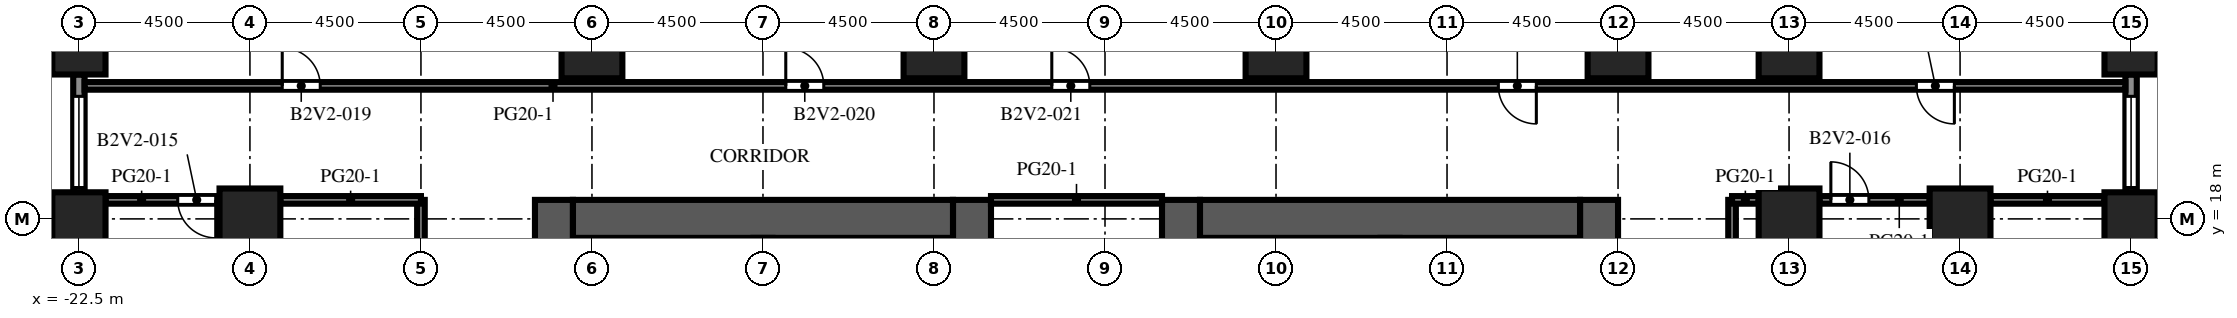
"""IFC4 building model, lengths in metres.
Left out: names, types, materials, properties, quantities, classifications, styles, units other than length and angle.
Written with IfcOpenShell. Run it as: python <this file> out.ifc"""

import sys

from ifc_helpers import new_model, si_unit, direction, frame, frame_2d, origin, origin_2d, place, context, subcontext, project, spatial, rectangle, extrude, element, fill, save


model = new_model("IFC4")
c1 = context("Model", 3, precision=1e-05, world=origin(), true_north=direction((0.0, 1.0)))
c2 = subcontext(c1, "Body", "Model", "MODEL_VIEW")
j1 = project(units=[si_unit("LENGTHUNIT", "METRE"), si_unit("PLANEANGLEUNIT", "RADIAN")], contexts=[c1])
p1 = place(None, origin())
s1 = spatial("IfcSite", under=j1, at=p1, CompositionType="ELEMENT")
p2 = place(p1, origin())
s2 = spatial("IfcBuilding", under=s1, at=p2, CompositionType="ELEMENT")
p3 = place(p2, frame((0.0, 0.0, 58.3)))
s3 = spatial("IfcBuildingStorey", under=s2, at=p3, CompositionType="ELEMENT", Elevation=58.3)
for number, where, z_axis, x_axis in (
    (1, (-22.5, 18.0, 0.0), (0.0, 0.0, 1.0), (1.0, 0.0, 0.0)),
    (2, (-22.5, 22.5, 0.0), (0.0, 0.0, 1.0), (1.0, 0.0, 0.0)),
    (3, (31.5, 18.0, 0.0), (0.0, 0.0, 1.0), (1.0, 0.0, 0.0)),
    (4, (31.5, 22.5, 0.0), (0.0, 0.0, 1.0), (1.0, 0.0, 0.0)),
):
    element("IfcColumn", number, at=place(p3, frame(where, z_axis=z_axis, x_axis=x_axis)), inside=s3, PredefinedType="COLUMN", context=c2, shape_type="SweptSolid", body=[
        extrude(rectangle(XDim=1.4, YDim=1.4, at=origin_2d()), origin(), (0.0, 0.0, 1.0), 4.1),
    ])
for number, where, z_axis, x_axis in (
    (5, (-18.0, 18.0, 0.0), (0.0, 0.0, 1.0), (1.0, 0.0, 0.0)),
    (6, (-9.0, 22.5, 0.0), (0.0, 0.0, 1.0), (1.0, 0.0, 0.0)),
    (7, (0.0, 22.5, 0.0), (0.0, 0.0, 1.0), (1.0, 0.0, 0.0)),
    (8, (9.0, 22.5, 0.0), (0.0, 0.0, 1.0), (1.0, 0.0, 0.0)),
    (9, (18.0, 22.5, 0.0), (0.0, 0.0, 1.0), (1.0, 0.0, 0.0)),
    (10, (22.5, 18.0, 0.0), (0.0, 0.0, 1.0), (1.0, 0.0, 0.0)),
    (11, (22.5, 22.5, 0.0), (0.0, 0.0, 1.0), (1.0, 0.0, 0.0)),
    (12, (27.0, 18.0, 0.0), (0.0, 0.0, 1.0), (1.0, 0.0, 0.0)),
):
    element("IfcColumn", number, at=place(p3, frame(where, z_axis=z_axis, x_axis=x_axis)), inside=s3, PredefinedType="COLUMN", context=c2, shape_type="SweptSolid", body=[
        extrude(rectangle(XDim=1.6, YDim=1.6, at=origin_2d()), origin(), (0.0, 0.0, 1.0), 4.1),
    ])
p4 = place(p3, frame((-10.0, -9.0, 0.0), z_axis=(0.0, 0.0, 1.0), x_axis=(0.0, 1.0, 0.0)))
e13 = element("IfcWall", 13, at=p4, inside=s3, PredefinedType="SHEAR", context=c2, shape_type="SweptSolid", body=[
    extrude(rectangle(XDim=27.5, YDim=1.0, at=frame_2d((13.75, 0.0))), origin(), (0.0, 0.0, 1.0), 4.1),
])
p5 = place(p4, frame((12.55, 0.0, 0.0)))
e14 = element("IfcOpeningElement", 14, at=p5, cuts=e13, PredefinedType="OPENING", context=c2, shape_type="SweptSolid", body=[
    extrude(rectangle(XDim=2.4, YDim=2.4, at=frame_2d((1.2, 1.2))), frame((0.0, 0.51, 0.0), z_axis=(0.0, -1.0, 0.0), x_axis=(1.0, 0.0, 0.0)), (0.0, 0.0, 1.0), 1.02),
])
p6 = place(p4, frame((6.825, 0.0, 0.0)))
e15 = element("IfcOpeningElement", 15, at=p6, cuts=e13, PredefinedType="OPENING", context=c2, shape_type="SweptSolid", body=[
    extrude(rectangle(XDim=1.2, YDim=2.1, at=frame_2d((0.6, 1.05))), frame((0.0, 0.51, 0.0), z_axis=(0.0, -1.0, 0.0), x_axis=(1.0, 0.0, 0.0)), (0.0, 0.0, 1.0), 1.02),
])
p7 = place(p4, frame((19.475, 0.0, 0.0)))
e16 = element("IfcOpeningElement", 16, at=p7, cuts=e13, PredefinedType="OPENING", context=c2, shape_type="SweptSolid", body=[
    extrude(rectangle(XDim=1.2, YDim=2.1, at=frame_2d((0.6, 1.05))), frame((0.0, 0.51, 0.0), z_axis=(0.0, -1.0, 0.0), x_axis=(1.0, 0.0, 0.0)), (0.0, 0.0, 1.0), 1.02),
])
p8 = place(p3, frame((1.0, -9.0, 0.0), z_axis=(0.0, 0.0, 1.0), x_axis=(0.0, 1.0, 0.0)))
e17 = element("IfcWall", 17, at=p8, inside=s3, PredefinedType="SHEAR", context=c2, shape_type="SweptSolid", body=[
    extrude(rectangle(XDim=27.5, YDim=1.0, at=frame_2d((13.75, 0.0))), origin(), (0.0, 0.0, 1.0), 4.1),
])
p9 = place(p8, frame((12.55, 0.0, 0.0)))
e18 = element("IfcOpeningElement", 18, at=p9, cuts=e17, PredefinedType="OPENING", context=c2, shape_type="SweptSolid", body=[
    extrude(rectangle(XDim=2.4, YDim=2.4, at=frame_2d((1.2, 1.2))), frame((0.0, 0.51, 0.0), z_axis=(0.0, -1.0, 0.0), x_axis=(1.0, 0.0, 0.0)), (0.0, 0.0, 1.0), 1.02),
])
p10 = place(p8, frame((5.55, 0.0, 0.0)))
e19 = element("IfcOpeningElement", 19, at=p10, cuts=e17, PredefinedType="OPENING", context=c2, shape_type="SweptSolid", body=[
    extrude(rectangle(XDim=0.905, YDim=2.1, at=frame_2d((0.453, 1.05))), frame((0.0, 0.51, 0.0), z_axis=(0.0, -1.0, 0.0), x_axis=(1.0, 0.0, 0.0)), (0.0, 0.0, 1.0), 1.02),
])
p11 = place(p8, frame((23.363, 0.0, 0.0)))
e20 = element("IfcOpeningElement", 20, at=p11, cuts=e17, PredefinedType="OPENING", context=c2, shape_type="SweptSolid", body=[
    extrude(rectangle(XDim=1.2, YDim=2.1, at=frame_2d((0.6, 1.05))), frame((0.0, 0.51, 0.0), z_axis=(0.0, -1.0, 0.0), x_axis=(1.0, 0.0, 0.0)), (0.0, 0.0, 1.0), 1.02),
])
p12 = place(p3, frame((-9.5, 18.0, 0.0), z_axis=(0.0, 0.0, 1.0), x_axis=(1.0, 0.0, 0.0)))
e21 = element("IfcWall", 21, at=p12, inside=s3, PredefinedType="SHEAR", context=c2, shape_type="SweptSolid", body=[
    extrude(rectangle(XDim=10.0, YDim=1.0, at=frame_2d((5.0, 0.0))), origin(), (0.0, 0.0, 1.0), 4.1),
])
p13 = place(p3, frame((6.5, -9.0, 0.0), z_axis=(0.0, 0.0, 1.0), x_axis=(0.0, 1.0, 0.0)))
e22 = element("IfcWall", 22, at=p13, inside=s3, PredefinedType="SHEAR", context=c2, shape_type="SweptSolid", body=[
    extrude(rectangle(XDim=27.5, YDim=1.0, at=frame_2d((13.75, 0.0))), origin(), (0.0, 0.0, 1.0), 4.1),
])
p14 = place(p13, frame((12.55, 0.0, 0.0)))
e23 = element("IfcOpeningElement", 23, at=p14, cuts=e22, PredefinedType="OPENING", context=c2, shape_type="SweptSolid", body=[
    extrude(rectangle(XDim=2.4, YDim=2.4, at=frame_2d((1.2, 1.2))), frame((0.0, 0.51, 0.0), z_axis=(0.0, -1.0, 0.0), x_axis=(1.0, 0.0, 0.0)), (0.0, 0.0, 1.0), 1.02),
])
p15 = place(p13, frame((5.55, 0.0, 0.0)))
e24 = element("IfcOpeningElement", 24, at=p15, cuts=e22, PredefinedType="OPENING", context=c2, shape_type="SweptSolid", body=[
    extrude(rectangle(XDim=0.905, YDim=2.1, at=frame_2d((0.453, 1.05))), frame((0.0, 0.51, 0.0), z_axis=(0.0, -1.0, 0.0), x_axis=(1.0, 0.0, 0.0)), (0.0, 0.0, 1.0), 1.02),
])
p16 = place(p13, frame((23.363, 0.0, 0.0)))
e25 = element("IfcOpeningElement", 25, at=p16, cuts=e22, PredefinedType="OPENING", context=c2, shape_type="SweptSolid", body=[
    extrude(rectangle(XDim=1.2, YDim=2.1, at=frame_2d((0.6, 1.05))), frame((0.0, 0.51, 0.0), z_axis=(0.0, -1.0, 0.0), x_axis=(1.0, 0.0, 0.0)), (0.0, 0.0, 1.0), 1.02),
])
p17 = place(p3, frame((17.5, -9.0, 0.0), z_axis=(0.0, 0.0, 1.0), x_axis=(0.0, 1.0, 0.0)))
e26 = element("IfcWall", 26, at=p17, inside=s3, PredefinedType="SHEAR", context=c2, shape_type="SweptSolid", body=[
    extrude(rectangle(XDim=27.5, YDim=1.0, at=frame_2d((13.75, 0.0))), origin(), (0.0, 0.0, 1.0), 4.1),
])
p18 = place(p17, frame((12.55, 0.0, 0.0)))
e27 = element("IfcOpeningElement", 27, at=p18, cuts=e26, PredefinedType="OPENING", context=c2, shape_type="SweptSolid", body=[
    extrude(rectangle(XDim=2.4, YDim=2.4, at=frame_2d((1.2, 1.2))), frame((0.0, 0.51, 0.0), z_axis=(0.0, -1.0, 0.0), x_axis=(1.0, 0.0, 0.0)), (0.0, 0.0, 1.0), 1.02),
])
p19 = place(p17, frame((6.825, 0.0, 0.0)))
e28 = element("IfcOpeningElement", 28, at=p19, cuts=e26, PredefinedType="OPENING", context=c2, shape_type="SweptSolid", body=[
    extrude(rectangle(XDim=1.2, YDim=2.1, at=frame_2d((0.6, 1.05))), frame((0.0, 0.51, 0.0), z_axis=(0.0, -1.0, 0.0), x_axis=(1.0, 0.0, 0.0)), (0.0, 0.0, 1.0), 1.02),
])
p20 = place(p17, frame((19.475, 0.0, 0.0)))
e29 = element("IfcOpeningElement", 29, at=p20, cuts=e26, PredefinedType="OPENING", context=c2, shape_type="SweptSolid", body=[
    extrude(rectangle(XDim=1.2, YDim=2.1, at=frame_2d((0.6, 1.05))), frame((0.0, 0.51, 0.0), z_axis=(0.0, -1.0, 0.0), x_axis=(1.0, 0.0, 0.0)), (0.0, 0.0, 1.0), 1.02),
])
p21 = place(p3, frame((7.0, 18.0, 0.0), z_axis=(0.0, 0.0, 1.0), x_axis=(1.0, 0.0, 0.0)))
e30 = element("IfcWall", 30, at=p21, inside=s3, PredefinedType="SHEAR", context=c2, shape_type="SweptSolid", body=[
    extrude(rectangle(XDim=10.0, YDim=1.0, at=frame_2d((5.0, 0.0))), origin(), (0.0, 0.0, 1.0), 4.1),
])
p22 = place(p3, frame((31.5, 21.8, 0.0), z_axis=(0.0, 0.0, 1.0), x_axis=(0.0, -1.0, 0.0)))
e31 = element("IfcWall", 31, at=p22, inside=s3, PredefinedType="SOLIDWALL", context=c2, shape_type="SweptSolid", body=[
    extrude(rectangle(XDim=3.1, YDim=0.3, at=frame_2d((1.55, 0.0))), origin(), (0.0, 0.0, 1.0), 2.75),
])
p23 = place(p22, frame((0.575, 0.0, 0.8)))
e32 = element("IfcOpeningElement", 32, at=p23, cuts=e31, PredefinedType="OPENING", context=c2, shape_type="SweptSolid", body=[
    extrude(rectangle(XDim=2.4, YDim=1.7, at=frame_2d((1.2, 0.85))), frame((0.0, 0.16, 0.0), z_axis=(0.0, -1.0, 0.0), x_axis=(1.0, 0.0, 0.0)), (0.0, 0.0, 1.0), 0.32),
])
p24 = place(p3, frame((-22.5, 18.7, 0.0), z_axis=(0.0, 0.0, 1.0), x_axis=(0.0, 1.0, 0.0)))
e33 = element("IfcWall", 33, at=p24, inside=s3, PredefinedType="SOLIDWALL", context=c2, shape_type="SweptSolid", body=[
    extrude(rectangle(XDim=3.1, YDim=0.3, at=frame_2d((1.55, 0.0))), origin(), (0.0, 0.0, 1.0), 2.75),
])
p25 = place(p24, frame((0.125, 0.0, 0.8)))
e34 = element("IfcOpeningElement", 34, at=p25, cuts=e33, PredefinedType="OPENING", context=c2, shape_type="SweptSolid", body=[
    extrude(rectangle(XDim=2.4, YDim=1.7, at=frame_2d((1.2, 0.85))), frame((0.0, 0.16, 0.0), z_axis=(0.0, -1.0, 0.0), x_axis=(1.0, 0.0, 0.0)), (0.0, 0.0, 1.0), 0.32),
])
p26 = place(p3, frame((-13.5, -9.0, 0.0), z_axis=(0.0, 0.0, 1.0), x_axis=(0.0, 1.0, 0.0)))
e35 = element("IfcWall", 35, at=p26, inside=s3, PredefinedType="PARTITIONING", context=c2, shape_type="SweptSolid", body=[
    extrude(rectangle(XDim=27.5, YDim=0.2, at=frame_2d((13.75, 0.0))), origin(), (0.0, 0.0, 1.0), 3.65),
])
p27 = place(p26, frame((4.85, 0.0, 0.0)))
e36 = element("IfcOpeningElement", 36, at=p27, cuts=e35, PredefinedType="OPENING", context=c2, shape_type="SweptSolid", body=[
    extrude(rectangle(XDim=1.0, YDim=2.1, at=frame_2d((0.5, 1.05))), frame((0.0, 0.11, 0.0), z_axis=(0.0, -1.0, 0.0), x_axis=(1.0, 0.0, 0.0)), (0.0, 0.0, 1.0), 0.22),
])
p28 = place(p26, frame((16.35, 0.0, 0.0)))
e37 = element("IfcOpeningElement", 37, at=p28, cuts=e35, PredefinedType="OPENING", context=c2, shape_type="SweptSolid", body=[
    extrude(rectangle(XDim=1.0, YDim=2.1, at=frame_2d((0.5, 1.05))), frame((0.0, 0.11, 0.0), z_axis=(0.0, -1.0, 0.0), x_axis=(1.0, 0.0, 0.0)), (0.0, 0.0, 1.0), 0.22),
])
p29 = place(p3, frame((21.0, 18.5, 0.0), z_axis=(0.0, 0.0, 1.0), x_axis=(0.0, -1.0, 0.0)))
e38 = element("IfcWall", 38, at=p29, inside=s3, PredefinedType="PARTITIONING", context=c2, shape_type="SweptSolid", body=[
    extrude(rectangle(XDim=27.5, YDim=0.2, at=frame_2d((13.75, 0.0))), origin(), (0.0, 0.0, 1.0), 3.65),
])
p30 = place(p29, frame((19.4, 0.0, 0.0)))
e39 = element("IfcOpeningElement", 39, at=p30, cuts=e38, PredefinedType="OPENING", context=c2, shape_type="SweptSolid", body=[
    extrude(rectangle(XDim=1.0, YDim=2.1, at=frame_2d((0.5, 1.05))), frame((0.0, 0.11, 0.0), z_axis=(0.0, -1.0, 0.0), x_axis=(1.0, 0.0, 0.0)), (0.0, 0.0, 1.0), 0.22),
])
p31 = place(p29, frame((7.65, 0.0, 0.0)))
e40 = element("IfcOpeningElement", 40, at=p31, cuts=e38, PredefinedType="OPENING", context=c2, shape_type="SweptSolid", body=[
    extrude(rectangle(XDim=1.0, YDim=2.1, at=frame_2d((0.5, 1.05))), frame((0.0, 0.11, 0.0), z_axis=(0.0, -1.0, 0.0), x_axis=(1.0, 0.0, 0.0)), (0.0, 0.0, 1.0), 0.22),
])
p32 = place(p3, frame((-18.8, 18.5, 0.0), z_axis=(0.0, 0.0, 1.0), x_axis=(-1.0, 0.0, 0.0)))
e41 = element("IfcWall", 41, at=p32, inside=s3, PredefinedType="PARTITIONING", context=c2, shape_type="SweptSolid", body=[
    extrude(rectangle(XDim=3.0, YDim=0.2, at=frame_2d((1.5, 0.0))), origin(), (0.0, 0.0, 1.0), 3.65),
])
p33 = place(p32, frame((0.1, 0.0, 0.0)))
e42 = element("IfcOpeningElement", 42, at=p33, cuts=e41, PredefinedType="OPENING", context=c2, shape_type="SweptSolid", body=[
    extrude(rectangle(XDim=1.0, YDim=2.1, at=frame_2d((0.5, 1.05))), frame((0.0, 0.11, 0.0), z_axis=(0.0, -1.0, 0.0), x_axis=(1.0, 0.0, 0.0)), (0.0, 0.0, 1.0), 0.22),
])
p34 = place(p3, frame((-17.2, 18.5, 0.0), z_axis=(0.0, 0.0, 1.0), x_axis=(1.0, 0.0, 0.0)))
e43 = element("IfcWall", 43, at=p34, inside=s3, PredefinedType="PARTITIONING", context=c2, shape_type="SweptSolid", body=[
    extrude(rectangle(XDim=3.7, YDim=0.2, at=frame_2d((1.85, 0.0))), origin(), (0.0, 0.0, 1.0), 3.65),
])
p35 = place(p3, frame((1.5, 18.5, 0.0), z_axis=(0.0, 0.0, 1.0), x_axis=(1.0, 0.0, 0.0)))
e44 = element("IfcWall", 44, at=p35, inside=s3, PredefinedType="PARTITIONING", context=c2, shape_type="SweptSolid", body=[
    extrude(rectangle(XDim=4.5, YDim=0.2, at=frame_2d((2.25, 0.0))), origin(), (0.0, 0.0, 1.0), 3.65),
])
p36 = place(p3, frame((21.0, 18.5, 0.0), z_axis=(0.0, 0.0, 1.0), x_axis=(1.0, 0.0, 0.0)))
e45 = element("IfcWall", 45, at=p36, inside=s3, PredefinedType="PARTITIONING", context=c2, shape_type="SweptSolid", body=[
    extrude(rectangle(XDim=0.7, YDim=0.2, at=frame_2d((0.35, 0.0))), origin(), (0.0, 0.0, 1.0), 3.65),
])
p37 = place(p3, frame((26.2, 18.5, 0.0), z_axis=(0.0, 0.0, 1.0), x_axis=(-1.0, 0.0, 0.0)))
e46 = element("IfcWall", 46, at=p37, inside=s3, PredefinedType="PARTITIONING", context=c2, shape_type="SweptSolid", body=[
    extrude(rectangle(XDim=2.9, YDim=0.2, at=frame_2d((1.45, 0.0))), origin(), (0.0, 0.0, 1.0), 3.65),
])
p38 = place(p37, frame((1.6, 0.0, 0.0)))
e47 = element("IfcOpeningElement", 47, at=p38, cuts=e46, PredefinedType="OPENING", context=c2, shape_type="SweptSolid", body=[
    extrude(rectangle(XDim=1.0, YDim=2.1, at=frame_2d((0.5, 1.05))), frame((0.0, 0.11, 0.0), z_axis=(0.0, -1.0, 0.0), x_axis=(1.0, 0.0, 0.0)), (0.0, 0.0, 1.0), 0.22),
])
p39 = place(p3, frame((27.8, 18.5, 0.0), z_axis=(0.0, 0.0, 1.0), x_axis=(1.0, 0.0, 0.0)))
e48 = element("IfcWall", 48, at=p39, inside=s3, PredefinedType="PARTITIONING", context=c2, shape_type="SweptSolid", body=[
    extrude(rectangle(XDim=3.0, YDim=0.2, at=frame_2d((1.5, 0.0))), origin(), (0.0, 0.0, 1.0), 3.65),
])
p40 = place(p3, frame((-22.35, 21.5, 0.0), z_axis=(0.0, 0.0, 1.0), x_axis=(1.0, 0.0, 0.0)))
e49 = element("IfcWall", 49, at=p40, inside=s3, PredefinedType="PARTITIONING", context=c2, shape_type="SweptSolid", body=[
    extrude(rectangle(XDim=53.7, YDim=0.2, at=frame_2d((26.85, 0.0))), origin(), (0.0, 0.0, 1.0), 3.65),
])
p41 = place(p40, frame((5.2, 0.0, 0.0)))
e50 = element("IfcOpeningElement", 50, at=p41, cuts=e49, PredefinedType="OPENING", context=c2, shape_type="SweptSolid", body=[
    extrude(rectangle(XDim=1.0, YDim=2.1, at=frame_2d((0.5, 1.05))), frame((0.0, 0.11, 0.0), z_axis=(0.0, -1.0, 0.0), x_axis=(1.0, 0.0, 0.0)), (0.0, 0.0, 1.0), 0.22),
])
p42 = place(p40, frame((18.45, 0.0, 0.0)))
e51 = element("IfcOpeningElement", 51, at=p42, cuts=e49, PredefinedType="OPENING", context=c2, shape_type="SweptSolid", body=[
    extrude(rectangle(XDim=1.0, YDim=2.1, at=frame_2d((0.5, 1.05))), frame((0.0, 0.11, 0.0), z_axis=(0.0, -1.0, 0.0), x_axis=(1.0, 0.0, 0.0)), (0.0, 0.0, 1.0), 0.22),
])
p43 = place(p40, frame((25.45, 0.0, 0.0)))
e52 = element("IfcOpeningElement", 52, at=p43, cuts=e49, PredefinedType="OPENING", context=c2, shape_type="SweptSolid", body=[
    extrude(rectangle(XDim=1.0, YDim=2.1, at=frame_2d((0.5, 1.05))), frame((0.0, 0.11, 0.0), z_axis=(0.0, -1.0, 0.0), x_axis=(1.0, 0.0, 0.0)), (0.0, 0.0, 1.0), 0.22),
])
p44 = place(p40, frame((37.2, 0.0, 0.0)))
e53 = element("IfcOpeningElement", 53, at=p44, cuts=e49, PredefinedType="OPENING", context=c2, shape_type="SweptSolid", body=[
    extrude(rectangle(XDim=1.0, YDim=2.1, at=frame_2d((0.5, 1.05))), frame((0.0, 0.11, 0.0), z_axis=(0.0, -1.0, 0.0), x_axis=(1.0, 0.0, 0.0)), (0.0, 0.0, 1.0), 0.22),
])
p45 = place(p40, frame((48.2, 0.0, 0.0)))
e54 = element("IfcOpeningElement", 54, at=p45, cuts=e49, PredefinedType="OPENING", context=c2, shape_type="SweptSolid", body=[
    extrude(rectangle(XDim=1.0, YDim=2.1, at=frame_2d((0.5, 1.05))), frame((0.0, 0.11, 0.0), z_axis=(0.0, -1.0, 0.0), x_axis=(1.0, 0.0, 0.0)), (0.0, 0.0, 1.0), 0.22),
])
p46 = place(p23, origin())
e55 = element("IfcWindow", 55, at=p46, inside=s3, PartitioningType="SINGLE_PANEL", PredefinedType="WINDOW", context=c2, shape_type="SweptSolid", body=[
    extrude(rectangle(XDim=2.4, YDim=1.7, at=frame_2d((1.2, 0.85))), frame((0.0, 0.03, 0.0), z_axis=(0.0, -1.0, 0.0), x_axis=(1.0, 0.0, 0.0)), (0.0, 0.0, 1.0), 0.06),
])
fill(e32, e55)
p47 = place(p25, origin())
e56 = element("IfcWindow", 56, at=p47, inside=s3, PartitioningType="SINGLE_PANEL", PredefinedType="WINDOW", context=c2, shape_type="SweptSolid", body=[
    extrude(rectangle(XDim=2.4, YDim=1.7, at=frame_2d((1.2, 0.85))), frame((0.0, 0.03, 0.0), z_axis=(0.0, -1.0, 0.0), x_axis=(1.0, 0.0, 0.0)), (0.0, 0.0, 1.0), 0.06),
])
fill(e34, e56)
p48 = place(p33, origin())
e57 = element("IfcDoor", 57, at=p48, inside=s3, OperationType="SINGLE_SWING_LEFT", PredefinedType="DOOR", context=c2, shape_type="SweptSolid", body=[
    extrude(rectangle(XDim=1.0, YDim=2.1, at=frame_2d((0.5, 1.05))), frame((0.0, 0.025, 0.0), z_axis=(0.0, -1.0, 0.0), x_axis=(1.0, 0.0, 0.0)), (0.0, 0.0, 1.0), 0.05),
])
fill(e42, e57)
p49 = place(p38, origin())
e58 = element("IfcDoor", 58, at=p49, inside=s3, OperationType="SINGLE_SWING_RIGHT", PredefinedType="DOOR", context=c2, shape_type="SweptSolid", body=[
    extrude(rectangle(XDim=1.0, YDim=2.1, at=frame_2d((0.5, 1.05))), frame((0.0, 0.025, 0.0), z_axis=(0.0, -1.0, 0.0), x_axis=(1.0, 0.0, 0.0)), (0.0, 0.0, 1.0), 0.05),
])
fill(e47, e58)
p50 = place(p41, origin())
e59 = element("IfcDoor", 59, at=p50, inside=s3, OperationType="SINGLE_SWING_LEFT", PredefinedType="DOOR", context=c2, shape_type="SweptSolid", body=[
    extrude(rectangle(XDim=1.0, YDim=2.1, at=frame_2d((0.5, 1.05))), frame((0.0, 0.025, 0.0), z_axis=(0.0, -1.0, 0.0), x_axis=(1.0, 0.0, 0.0)), (0.0, 0.0, 1.0), 0.05),
])
fill(e50, e59)
p51 = place(p42, origin())
e60 = element("IfcDoor", 60, at=p51, inside=s3, OperationType="SINGLE_SWING_LEFT", PredefinedType="DOOR", context=c2, shape_type="SweptSolid", body=[
    extrude(rectangle(XDim=1.0, YDim=2.1, at=frame_2d((0.5, 1.05))), frame((0.0, 0.025, 0.0), z_axis=(0.0, -1.0, 0.0), x_axis=(1.0, 0.0, 0.0)), (0.0, 0.0, 1.0), 0.05),
])
fill(e51, e60)
p52 = place(p43, origin())
e61 = element("IfcDoor", 61, at=p52, inside=s3, OperationType="SINGLE_SWING_LEFT", PredefinedType="DOOR", context=c2, shape_type="SweptSolid", body=[
    extrude(rectangle(XDim=1.0, YDim=2.1, at=frame_2d((0.5, 1.05))), frame((0.0, 0.025, 0.0), z_axis=(0.0, -1.0, 0.0), x_axis=(1.0, 0.0, 0.0)), (0.0, 0.0, 1.0), 0.05),
])
fill(e52, e61)
p53 = place(p44, origin())
e62 = element("IfcDoor", 62, at=p53, inside=s3, OperationType="SINGLE_SWING_RIGHT", PredefinedType="DOOR", context=c2, shape_type="SweptSolid", body=[
    extrude(rectangle(XDim=1.0, YDim=2.1, at=frame_2d((0.5, 1.05))), frame((0.0, 0.025, 0.0), z_axis=(0.0, -1.0, 0.0), x_axis=(1.0, 0.0, 0.0)), (0.0, 0.0, 1.0), 0.05),
])
fill(e53, e62)
p54 = place(p45, origin())
e63 = element("IfcDoor", 63, at=p54, inside=s3, OperationType="SINGLE_SWING_RIGHT", PredefinedType="DOOR", context=c2, shape_type="SweptSolid", body=[
    extrude(rectangle(XDim=1.0, YDim=2.1, at=frame_2d((0.5, 1.05))), frame((0.0, 0.025, 0.0), z_axis=(0.0, -1.0, 0.0), x_axis=(1.0, 0.0, 0.0)), (0.0, 0.0, 1.0), 0.05),
])
fill(e54, e63)
save(model, sys.argv[1])
